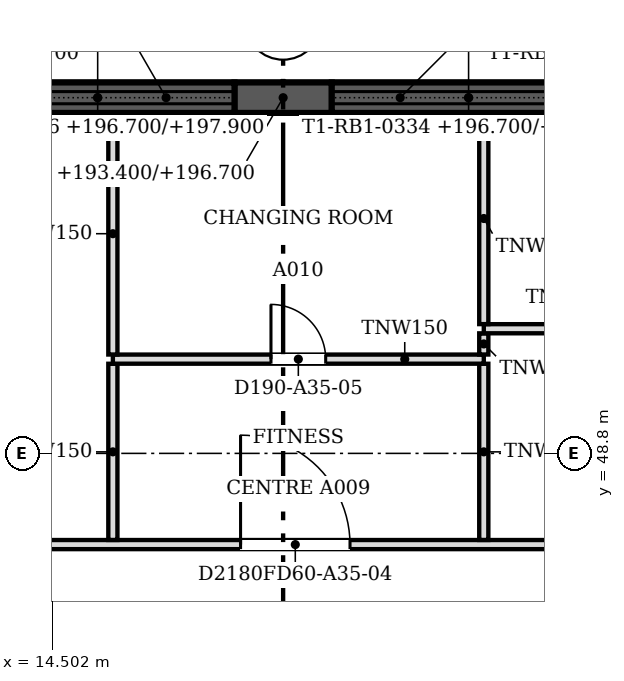
"""IFC4 building model, lengths in metres.
Left out: names, types, materials, properties, quantities, classifications, styles, units other than length and angle.
Written with IfcOpenShell. Run it as: python <this file> out.ifc"""

import sys

from ifc_helpers import new_model, si_unit, direction, frame, frame_2d, origin, place, context, subcontext, project, spatial, polyline, rectangle, outline, extrude, faceted_brep, source, transform, mapped, element, fill, save


model = new_model("IFC4")
c1 = context("Model", 3, precision=1e-05, world=origin(), true_north=direction((0.0, 1.0)))
c2 = subcontext(c1, "Body", "Model", "MODEL_VIEW")
j1 = project(units=[si_unit("LENGTHUNIT", "METRE"), si_unit("PLANEANGLEUNIT", "RADIAN")], contexts=[c1])
p1 = place(None, origin())
s1 = spatial("IfcSite", under=j1, at=p1, CompositionType="ELEMENT")
p2 = place(p1, origin())
s2 = spatial("IfcBuilding", under=s1, at=p2, CompositionType="ELEMENT")
p3 = place(p2, frame((0.0, 0.0, 193.4)))
s3 = spatial("IfcBuildingStorey", under=s2, at=p3, CompositionType="ELEMENT", Elevation=193.4)
m1 = source(origin(), c2, "Body", "SweptSolid", [
    extrude(outline(polyline([(0.0, 0.0), (1.6, 0.0), (1.6, 3.3), (0.0, 3.3), (0.0, 0.0)])), frame((0.0, 0.25, 0.0), z_axis=(0.0, -1.0, 0.0), x_axis=(1.0, 0.0, 0.0)), (0.0, 0.0, 1.0), 0.5),
])
p4 = place(p3, frame((19.1, 54.65, 0.0), z_axis=(0.0, 0.0, 1.0), x_axis=(-1.0, 0.0, 0.0)))
e1 = element("IfcWall", 1, at=p4, inside=s3, PredefinedType="SOLIDWALL", context=c2, shape_type="MappedRepresentation", body=[
    mapped(m1, transform((0.0, 0.0, 0.0), scale=1.0)),
])
m2 = source(origin(), c2, "Body", "SweptSolid", [
    extrude(outline(polyline([(0.0, 0.0), (4.5, 0.0), (4.5, 0.9), (0.0, 0.9), (0.0, 0.0)])), frame((0.0, 0.25, 0.0), z_axis=(0.0, -1.0, 0.0), x_axis=(1.0, 0.0, 0.0)), (0.0, 0.0, 1.0), 0.5),
])
p5 = place(p3, frame((23.6, 54.65, 0.0), z_axis=(0.0, 0.0, 1.0), x_axis=(-1.0, 0.0, 0.0)))
e2 = element("IfcWall", 2, at=p5, inside=s3, PredefinedType="SOLIDWALL", context=c2, shape_type="MappedRepresentation", body=[
    mapped(m2, transform((0.0, 0.0, 0.0), scale=1.0)),
])
m3 = source(origin(), c2, "Body", "Brep", [
    faceted_brep([(0.0, -0.25, 0.0), (6.1, -0.25, 0.0), (6.1, -0.25, 1.2), (0.0, -0.25, 1.2), (0.0, 0.25, 1.2), (6.1, 0.25, 1.2), (6.1, 0.25, 0.0), (0.0, 0.25, 0.0)], [[[0, 1, 2, 3]], [[4, 5, 6, 7]], [[7, 6, 1, 0]], [[5, 4, 3, 2]], [[4, 7, 0, 3]], [[1, 6, 5, 2]]]),
])
p6 = place(p3, frame((24.4, 54.65, 3.3), z_axis=(0.0, 0.0, 1.0), x_axis=(-1.0, 0.0, 0.0)))
e3 = element("IfcWall", 3, at=p6, inside=s3, PredefinedType="SOLIDWALL", context=c2, shape_type="MappedRepresentation", body=[
    mapped(m3, transform((0.0, 0.0, 0.0), scale=1.0)),
])
p7 = place(p3, frame((17.5, 54.65, 0.0), z_axis=(0.0, 0.0, 1.0), x_axis=(-1.0, 0.0, 0.0)))
e4 = element("IfcWall", 4, at=p7, inside=s3, PredefinedType="SOLIDWALL", context=c2, shape_type="MappedRepresentation", body=[
    mapped(m2, transform((0.0, 0.0, 0.0), scale=1.0)),
])
m4 = source(origin(), c2, "Body", "SweptSolid", [
    extrude(outline(polyline([(0.0, 0.0), (6.1, 0.0), (6.1, 1.2), (0.0, 1.2), (0.0, 0.0)])), frame((0.0, 0.25, 0.0), z_axis=(0.0, -1.0, 0.0), x_axis=(1.0, 0.0, 0.0)), (0.0, 0.0, 1.0), 0.5),
])
p8 = place(p3, frame((18.3, 54.65, 3.3), z_axis=(0.0, 0.0, 1.0), x_axis=(-1.0, 0.0, 0.0)))
e5 = element("IfcWall", 5, at=p8, inside=s3, PredefinedType="SOLIDWALL", context=c2, shape_type="MappedRepresentation", body=[
    mapped(m4, transform((0.0, 0.0, 0.0), scale=1.0)),
])
p9 = place(p3, frame((7.5, 47.3, 0.0), z_axis=(0.0, 0.0, 1.0), x_axis=(1.0, 0.0, 0.0)))
e6 = element("IfcWall", 6, at=p9, inside=s3, PredefinedType="PARTITIONING", context=c2, shape_type="SweptSolid", body=[
    extrude(rectangle(XDim=20.6, YDim=0.15, at=frame_2d((10.3, 0.0))), origin(), (0.0, 0.0, 1.0), 3.767),
])
m5 = source(origin(), c2, "Body", "SweptSolid", [
    extrude(rectangle(XDim=1.1, YDim=2.1, at=frame_2d((0.55, 1.05))), frame((0.0, 0.085, 0.0), z_axis=(0.0, -1.0, 0.0), x_axis=(1.0, 0.0, 0.0)), (0.0, 0.0, 1.0), 0.17),
])
p10 = place(p9, frame((0.9, 0.0, 0.0)))
e7 = element("IfcOpeningElement", 7, at=p10, cuts=e6, PredefinedType="OPENING", context=c2, shape_type="MappedRepresentation", body=[
    mapped(m5, transform((0.0, 0.0, 0.0), scale=1.0)),
])
m6 = source(origin(), c2, "Body", "SweptSolid", [
    extrude(rectangle(XDim=1.8, YDim=2.1, at=frame_2d((0.9, 1.05))), frame((0.0, 0.085, 0.0), z_axis=(0.0, -1.0, 0.0), x_axis=(1.0, 0.0, 0.0)), (0.0, 0.0, 1.0), 0.17),
])
p11 = place(p9, frame((10.1, 0.0, 0.0)))
e8 = element("IfcOpeningElement", 8, at=p11, cuts=e6, PredefinedType="OPENING", context=c2, shape_type="MappedRepresentation", body=[
    mapped(m6, transform((0.0, 0.0, 0.0), scale=1.0)),
])
m7 = source(origin(), c2, "Body", "SweptSolid", [
    extrude(rectangle(XDim=1.0, YDim=2.1, at=frame_2d((0.5, 1.05))), frame((0.0, 0.085, 0.0), z_axis=(0.0, -1.0, 0.0), x_axis=(1.0, 0.0, 0.0)), (0.0, 0.0, 1.0), 0.17),
])
p12 = place(p9, frame((17.3, 0.0, 0.0)))
e9 = element("IfcOpeningElement", 9, at=p12, cuts=e6, PredefinedType="OPENING", context=c2, shape_type="MappedRepresentation", body=[
    mapped(m7, transform((0.0, 0.0, 0.0), scale=1.0)),
])
for number, where, z_axis, x_axis in (
    (10, (15.5, 47.376, 0.0), (0.0, 0.0, 1.0), (0.0, 1.0, 0.0)),
    (11, (21.6, 47.376, 0.0), (0.0, 0.0, 1.0), (0.0, 1.0, 0.0)),
):
    element("IfcWall", number, at=place(p3, frame(where, z_axis=z_axis, x_axis=x_axis)), inside=s3, PredefinedType="PARTITIONING", context=c2, shape_type="SweptSolid", body=[
        extrude(rectangle(XDim=2.898, YDim=0.15, at=frame_2d((1.449, 0.0))), origin(), (0.0, 0.0, 1.0), 3.767),
    ])
p13 = place(p3, frame((15.5, 50.35, 0.0), z_axis=(0.0, 0.0, 1.0), x_axis=(1.0, 0.0, 0.0)))
e12 = element("IfcWall", 12, at=p13, inside=s3, PredefinedType="PARTITIONING", context=c2, shape_type="SweptSolid", body=[
    extrude(rectangle(XDim=6.1, YDim=0.15, at=frame_2d((3.05, 0.0))), origin(), (0.0, 0.0, 1.0), 3.767),
])
m8 = source(origin(), c2, "Body", "SweptSolid", [
    extrude(rectangle(XDim=0.9, YDim=2.1, at=frame_2d((0.45, 1.05))), frame((0.0, 0.085, 0.0), z_axis=(0.0, -1.0, 0.0), x_axis=(1.0, 0.0, 0.0)), (0.0, 0.0, 1.0), 0.17),
])
p14 = place(p13, frame((2.6, 0.0, 0.0)))
e13 = element("IfcOpeningElement", 13, at=p14, cuts=e12, PredefinedType="OPENING", context=c2, shape_type="MappedRepresentation", body=[
    mapped(m8, transform((0.0, 0.0, 0.0), scale=1.0)),
])
p15 = place(p3, frame((15.5, 50.426, 0.0), z_axis=(0.0, 0.0, 1.0), x_axis=(0.0, 1.0, 0.0)))
e14 = element("IfcWall", 14, at=p15, inside=s3, PredefinedType="PARTITIONING", context=c2, shape_type="SweptSolid", body=[
    extrude(rectangle(XDim=3.974, YDim=0.15, at=frame_2d((1.987, 0.0))), origin(), (0.0, 0.0, 1.0), 3.767),
])
p16 = place(p3, frame((21.6, 50.426, 0.0), z_axis=(0.0, 0.0, 1.0), x_axis=(0.0, 1.0, 0.0)))
e15 = element("IfcWall", 15, at=p16, inside=s3, PredefinedType="PARTITIONING", context=c2, shape_type="SweptSolid", body=[
    extrude(rectangle(XDim=0.348, YDim=0.15, at=frame_2d((0.174, 0.0))), origin(), (0.0, 0.0, 1.0), 3.767),
])
p17 = place(p3, frame((21.6, 50.85, 0.0), z_axis=(0.0, 0.0, 1.0), x_axis=(1.0, 0.0, 0.0)))
e16 = element("IfcWall", 16, at=p17, inside=s3, PredefinedType="PARTITIONING", context=c2, shape_type="SweptSolid", body=[
    extrude(rectangle(XDim=6.424, YDim=0.15, at=frame_2d((3.212, 0.0))), origin(), (0.0, 0.0, 1.0), 3.767),
])
p18 = place(p17, frame((2.8, 0.0, 0.0)))
e17 = element("IfcOpeningElement", 17, at=p18, cuts=e16, PredefinedType="OPENING", context=c2, shape_type="MappedRepresentation", body=[
    mapped(m8, transform((0.0, 0.0, 0.0), scale=1.0)),
])
p19 = place(p3, frame((21.6, 50.926, 0.0), z_axis=(0.0, 0.0, 1.0), x_axis=(0.0, 1.0, 0.0)))
e18 = element("IfcWall", 18, at=p19, inside=s3, PredefinedType="PARTITIONING", context=c2, shape_type="SweptSolid", body=[
    extrude(rectangle(XDim=3.474, YDim=0.15, at=frame_2d((1.737, 0.0))), origin(), (0.0, 0.0, 1.0), 3.767),
])
m9 = source(origin(), c2, "Body", "SweptSolid", [
    extrude(rectangle(XDim=1.8, YDim=2.1, at=frame_2d((0.9, 1.05))), frame((0.0, 0.025, 0.0), z_axis=(0.0, -1.0, 0.0), x_axis=(1.0, 0.0, 0.0)), (0.0, 0.0, 1.0), 0.05),
])
p20 = place(p11, origin())
e19 = element("IfcDoor", 19, at=p20, inside=s3, OperationType="DOUBLE_DOOR_SINGLE_SWING", PredefinedType="DOOR", context=c2, shape_type="MappedRepresentation", body=[
    mapped(m9, transform((0.0, 0.0, 0.0), scale=1.0)),
])
fill(e8, e19)
m10 = source(origin(), c2, "Body", "SweptSolid", [
    extrude(rectangle(XDim=0.9, YDim=2.1, at=frame_2d((0.45, 1.05))), frame((0.0, 0.025, 0.0), z_axis=(0.0, -1.0, 0.0), x_axis=(1.0, 0.0, 0.0)), (0.0, 0.0, 1.0), 0.05),
])
p21 = place(p14, origin())
e20 = element("IfcDoor", 20, at=p21, inside=s3, OperationType="SINGLE_SWING_LEFT", PredefinedType="DOOR", context=c2, shape_type="MappedRepresentation", body=[
    mapped(m10, transform((0.0, 0.0, 0.0), scale=1.0)),
])
fill(e13, e20)
save(model, sys.argv[1])
